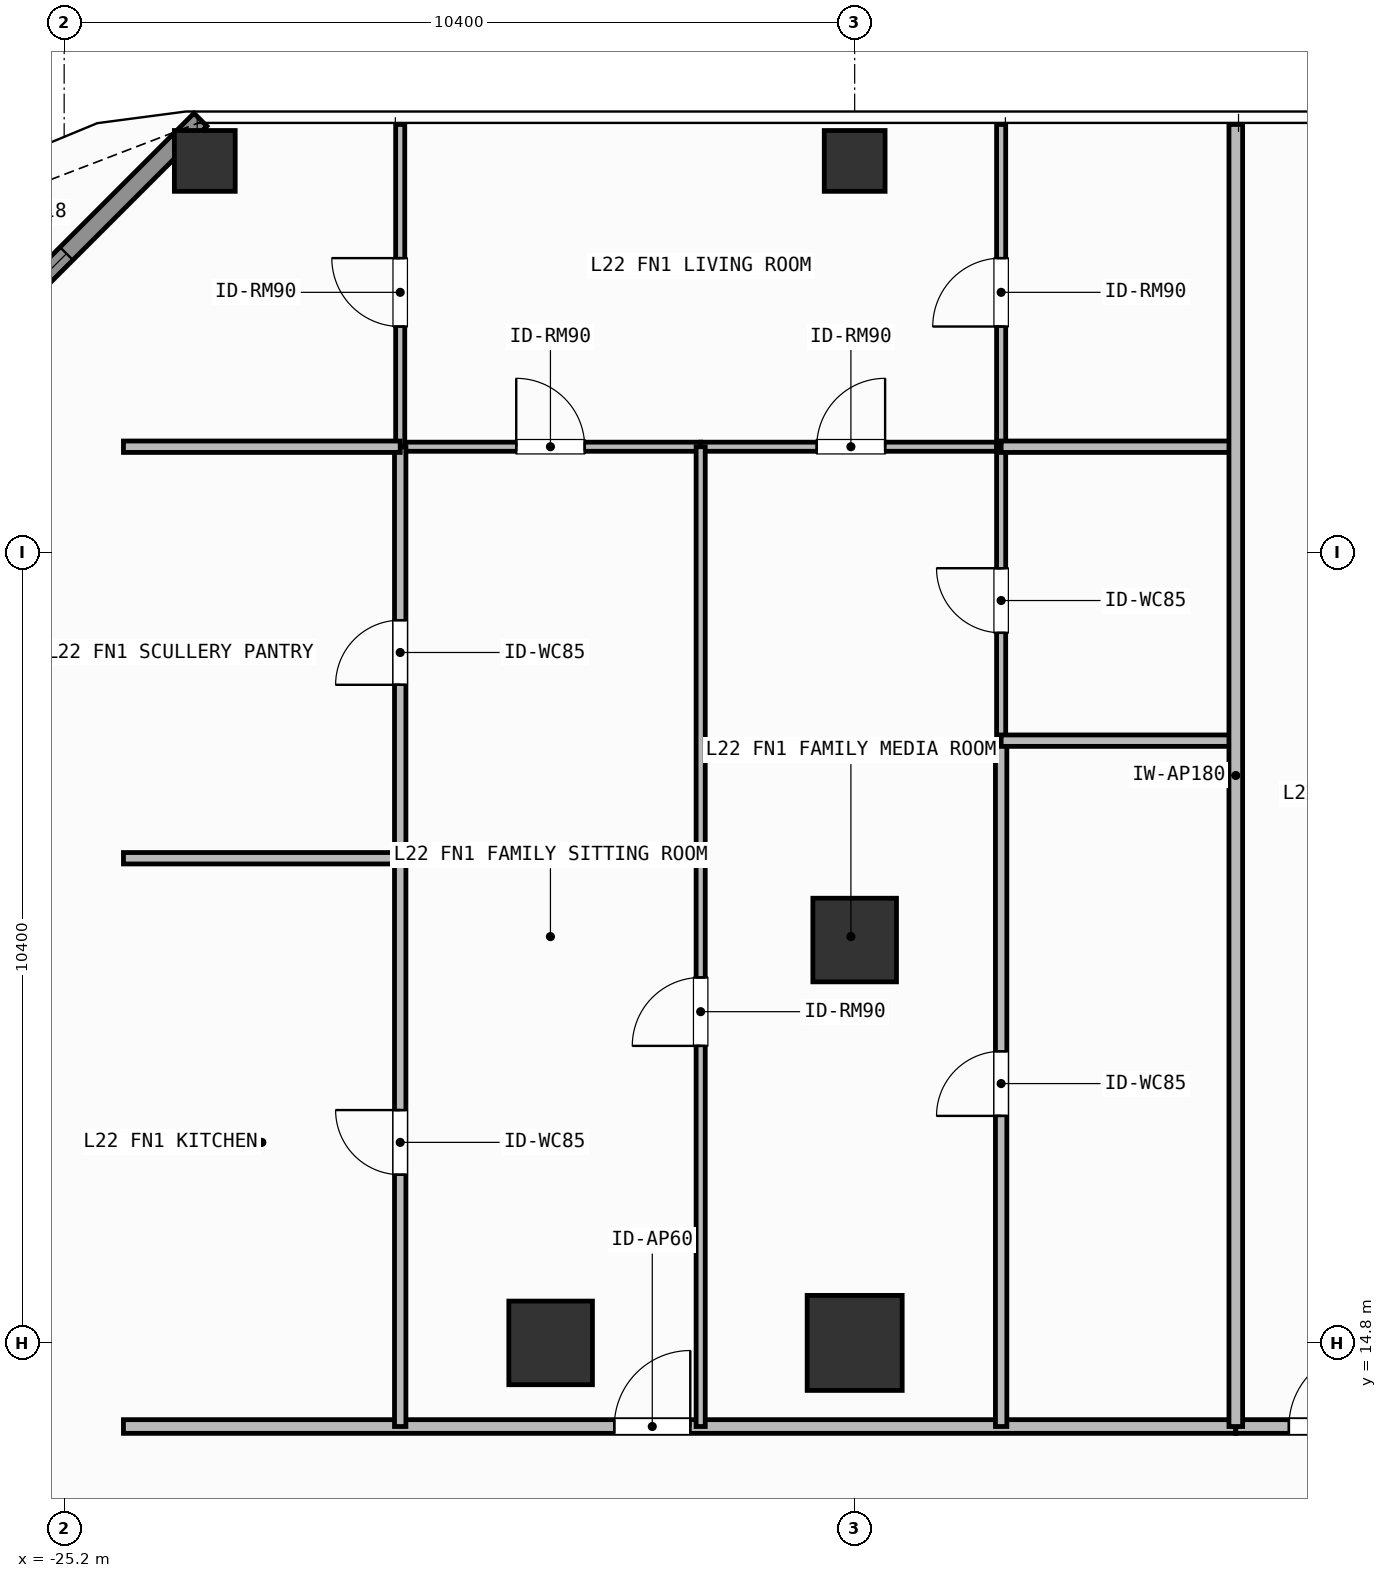
"""IFC4 building model, lengths in metres.
Left out: names, types, materials, properties, quantities, classifications, styles, units other than length and angle.
Written with IfcOpenShell. Run it as: python <this file> out.ifc"""

import sys

from ifc_helpers import new_model, si_unit, direction, frame, frame_2d, origin, origin_2d, place, context, subcontext, project, spatial, rectangle, hollow_rectangle, extrude, element, fill, save


model = new_model("IFC4")
c1 = context("Model", 3, precision=1e-05, world=origin(), true_north=direction((0.0, 1.0)))
c2 = subcontext(c1, "Body", "Model", "MODEL_VIEW")
j1 = project(units=[si_unit("LENGTHUNIT", "METRE"), si_unit("PLANEANGLEUNIT", "RADIAN")], contexts=[c1])
p1 = place(None, origin())
s1 = spatial("IfcSite", under=j1, at=p1, CompositionType="ELEMENT")
p2 = place(p1, origin())
s2 = spatial("IfcBuilding", under=s1, at=p2, CompositionType="ELEMENT")
p3 = place(p2, frame((0.0, 0.0, 89.1)))
s3 = spatial("IfcBuildingStorey", under=s2, at=p3, CompositionType="ELEMENT", Elevation=89.1)
p4 = place(p3, frame((-14.8, 14.8, 0.0), z_axis=(0.0, 0.0, 1.0), x_axis=(1.0, 0.0, 0.0)))
e1 = element("IfcColumn", 1, at=p4, inside=s3, PredefinedType="COLUMN", context=c2, shape_type="SweptSolid", body=[
    extrude(rectangle(XDim=1.25, YDim=1.25, at=origin_2d()), origin(), (0.0, 0.0, 1.0), 3.9),
])
for number, where, z_axis, x_axis in (
    (2, (-18.8, 14.8, 0.0), (0.0, 0.0, 1.0), (1.0, 0.0, 0.0)),
    (3, (-14.8, 20.1, 0.0), (0.0, 0.0, 1.0), (1.0, 0.0, 0.0)),
):
    element("IfcColumn", number, at=place(p3, frame(where, z_axis=z_axis, x_axis=x_axis)), inside=s3, PredefinedType="COLUMN", context=c2, shape_type="SweptSolid", body=[
        extrude(rectangle(XDim=1.1, YDim=1.1, at=origin_2d()), origin(), (0.0, 0.0, 1.0), 3.9),
    ])
for number, where, z_axis, x_axis in (
    (4, (-23.35, 30.35, 0.0), (0.0, 0.0, 1.0), (1.0, 0.0, 0.0)),
    (5, (-14.8, 30.35, 0.0), (0.0, 0.0, 1.0), (1.0, 0.0, 0.0)),
):
    element("IfcColumn", number, at=place(p3, frame(where, z_axis=z_axis, x_axis=x_axis)), inside=s3, PredefinedType="COLUMN", context=c2, shape_type="SweptSolid", body=[
        extrude(hollow_rectangle(XDim=0.8, YDim=0.8, WallThickness=0.036, at=origin_2d()), origin(), (0.0, 0.0, 1.0), 3.9),
    ])
p5 = place(p3, frame((-27.992, 26.308, 0.0), z_axis=(0.0, 0.0, 1.0), x_axis=(0.707106781187, 0.707106781187, 0.0)))
e6 = element("IfcWall", 6, at=p5, inside=s3, PredefinedType="SOLIDWALL", context=c2, shape_type="SweptSolid", body=[
    extrude(rectangle(XDim=6.484, YDim=0.24, at=frame_2d((3.242, 0.0))), origin(), (0.0, 0.0, 1.0), 3.68),
])
p6 = place(p5, frame((2.492, 0.0, 0.8)))
e7 = element("IfcOpeningElement", 7, at=p6, cuts=e6, PredefinedType="OPENING", context=c2, shape_type="SweptSolid", body=[
    extrude(rectangle(XDim=1.5, YDim=1.85, at=frame_2d((0.75, 0.925))), frame((0.0, 0.13, 0.0), z_axis=(0.0, -1.0, 0.0), x_axis=(1.0, 0.0, 0.0)), (0.0, 0.0, 1.0), 0.26),
])
p7 = place(p3, frame((-24.42, 13.7, 0.0), z_axis=(0.0, 0.0, 1.0), x_axis=(1.0, 0.0, 0.0)))
e8 = element("IfcWall", 8, at=p7, inside=s3, PredefinedType="PARTITIONING", context=c2, shape_type="SweptSolid", body=[
    extrude(rectangle(XDim=14.634, YDim=0.18, at=frame_2d((7.317, 0.0))), origin(), (0.0, 0.0, 1.0), 3.68),
])
p8 = place(p7, frame((6.457, 0.0, 0.0)))
e9 = element("IfcOpeningElement", 9, at=p8, cuts=e8, PredefinedType="OPENING", context=c2, shape_type="SweptSolid", body=[
    extrude(rectangle(XDim=1.0, YDim=2.2, at=frame_2d((0.5, 1.1))), frame((0.0, 0.1, 0.0), z_axis=(0.0, -1.0, 0.0), x_axis=(1.0, 0.0, 0.0)), (0.0, 0.0, 1.0), 0.2),
])
p9 = place(p3, frame((-20.779, 26.59, 0.0), z_axis=(0.0, 0.0, 1.0), x_axis=(1.0, 0.0, 0.0)))
e10 = element("IfcWall", 10, at=p9, inside=s3, PredefinedType="PARTITIONING", context=c2, shape_type="SweptSolid", body=[
    extrude(rectangle(XDim=3.953, YDim=0.12, at=frame_2d((1.977, 0.0))), origin(), (0.0, 0.0, 1.0), 3.68),
])
p10 = place(p9, frame((1.527, 0.0, 0.0)))
e11 = element("IfcOpeningElement", 11, at=p10, cuts=e10, PredefinedType="OPENING", context=c2, shape_type="SweptSolid", body=[
    extrude(rectangle(XDim=0.9, YDim=2.1, at=frame_2d((0.45, 1.05))), frame((0.0, 0.07, 0.0), z_axis=(0.0, -1.0, 0.0), x_axis=(1.0, 0.0, 0.0)), (0.0, 0.0, 1.0), 0.14),
])
p11 = place(p3, frame((-16.826, 26.59, 0.0), z_axis=(0.0, 0.0, 1.0), x_axis=(1.0, 0.0, 0.0)))
e12 = element("IfcWall", 12, at=p11, inside=s3, PredefinedType="PARTITIONING", context=c2, shape_type="SweptSolid", body=[
    extrude(rectangle(XDim=3.953, YDim=0.12, at=frame_2d((1.977, 0.0))), origin(), (0.0, 0.0, 1.0), 3.68),
])
p12 = place(p11, frame((1.527, 0.0, 0.0)))
e13 = element("IfcOpeningElement", 13, at=p12, cuts=e12, PredefinedType="OPENING", context=c2, shape_type="SweptSolid", body=[
    extrude(rectangle(XDim=0.9, YDim=2.1, at=frame_2d((0.45, 1.05))), frame((0.0, 0.07, 0.0), z_axis=(0.0, -1.0, 0.0), x_axis=(1.0, 0.0, 0.0)), (0.0, 0.0, 1.0), 0.14),
])
p13 = place(p3, frame((-16.826, 13.7, 0.0), z_axis=(0.0, 0.0, 1.0), x_axis=(0.0, 1.0, 0.0)))
e14 = element("IfcWall", 14, at=p13, inside=s3, PredefinedType="PARTITIONING", context=c2, shape_type="SweptSolid", body=[
    extrude(rectangle(XDim=12.89, YDim=0.12, at=frame_2d((6.445, 0.0))), origin(), (0.0, 0.0, 1.0), 3.68),
])
p14 = place(p13, frame((5.008, 0.0, 0.0)))
e15 = element("IfcOpeningElement", 15, at=p14, cuts=e14, PredefinedType="OPENING", context=c2, shape_type="SweptSolid", body=[
    extrude(rectangle(XDim=0.9, YDim=2.1, at=frame_2d((0.45, 1.05))), frame((0.0, 0.07, 0.0), z_axis=(0.0, -1.0, 0.0), x_axis=(1.0, 0.0, 0.0)), (0.0, 0.0, 1.0), 0.14),
])
p15 = place(p3, frame((-20.779, 13.7, 0.0), z_axis=(0.0, 0.0, 1.0), x_axis=(0.0, 1.0, 0.0)))
e16 = element("IfcWall", 16, at=p15, inside=s3, PredefinedType="PARTITIONING", context=c2, shape_type="SweptSolid", body=[
    extrude(rectangle(XDim=7.476, YDim=0.15, at=frame_2d((3.738, 0.0))), origin(), (0.0, 0.0, 1.0), 3.68),
])
p16 = place(p15, frame((3.313, 0.0, 0.0)))
e17 = element("IfcOpeningElement", 17, at=p16, cuts=e16, PredefinedType="OPENING", context=c2, shape_type="SweptSolid", body=[
    extrude(rectangle(XDim=0.85, YDim=2.1, at=frame_2d((0.425, 1.05))), frame((0.0, 0.085, 0.0), z_axis=(0.0, -1.0, 0.0), x_axis=(1.0, 0.0, 0.0)), (0.0, 0.0, 1.0), 0.17),
])
p17 = place(p3, frame((-20.779, 21.176, 0.0), z_axis=(0.0, 0.0, 1.0), x_axis=(0.0, 1.0, 0.0)))
e18 = element("IfcWall", 18, at=p17, inside=s3, PredefinedType="PARTITIONING", context=c2, shape_type="SweptSolid", body=[
    extrude(rectangle(XDim=5.414, YDim=0.15, at=frame_2d((2.707, 0.0))), origin(), (0.0, 0.0, 1.0), 3.68),
])
p18 = place(p17, frame((2.282, 0.0, 0.0)))
e19 = element("IfcOpeningElement", 19, at=p18, cuts=e18, PredefinedType="OPENING", context=c2, shape_type="SweptSolid", body=[
    extrude(rectangle(XDim=0.85, YDim=2.1, at=frame_2d((0.425, 1.05))), frame((0.0, 0.085, 0.0), z_axis=(0.0, -1.0, 0.0), x_axis=(1.0, 0.0, 0.0)), (0.0, 0.0, 1.0), 0.17),
])
p19 = place(p3, frame((-20.779, 26.59, 0.0), z_axis=(0.0, 0.0, 1.0), x_axis=(0.0, 1.0, 0.0)))
e20 = element("IfcWall", 20, at=p19, inside=s3, PredefinedType="PARTITIONING", context=c2, shape_type="SweptSolid", body=[
    extrude(rectangle(XDim=4.24, YDim=0.12, at=frame_2d((2.12, 0.0))), origin(), (0.0, 0.0, 1.0), 3.68),
])
p20 = place(p19, frame((1.581, 0.0, 0.0)))
e21 = element("IfcOpeningElement", 21, at=p20, cuts=e20, PredefinedType="OPENING", context=c2, shape_type="SweptSolid", body=[
    extrude(rectangle(XDim=0.9, YDim=2.1, at=frame_2d((0.45, 1.05))), frame((0.0, 0.07, 0.0), z_axis=(0.0, -1.0, 0.0), x_axis=(1.0, 0.0, 0.0)), (0.0, 0.0, 1.0), 0.14),
])
p21 = place(p3, frame((-12.873, 13.7, 0.0), z_axis=(0.0, 0.0, 1.0), x_axis=(0.0, 1.0, 0.0)))
e22 = element("IfcWall", 22, at=p21, inside=s3, PredefinedType="PARTITIONING", context=c2, shape_type="SweptSolid", body=[
    extrude(rectangle(XDim=9.023, YDim=0.15, at=frame_2d((4.511, 0.0))), origin(), (0.0, 0.0, 1.0), 3.68),
])
p22 = place(p21, frame((4.086, 0.0, 0.0)))
e23 = element("IfcOpeningElement", 23, at=p22, cuts=e22, PredefinedType="OPENING", context=c2, shape_type="SweptSolid", body=[
    extrude(rectangle(XDim=0.85, YDim=2.1, at=frame_2d((0.425, 1.05))), frame((0.0, 0.085, 0.0), z_axis=(0.0, -1.0, 0.0), x_axis=(1.0, 0.0, 0.0)), (0.0, 0.0, 1.0), 0.17),
])
p23 = place(p3, frame((-12.873, 22.723, 0.0), z_axis=(0.0, 0.0, 1.0), x_axis=(0.0, 1.0, 0.0)))
e24 = element("IfcWall", 24, at=p23, inside=s3, PredefinedType="PARTITIONING", context=c2, shape_type="SweptSolid", body=[
    extrude(rectangle(XDim=3.867, YDim=0.12, at=frame_2d((1.934, 0.0))), origin(), (0.0, 0.0, 1.0), 3.68),
])
p24 = place(p23, frame((1.419, 0.0, 0.0)))
e25 = element("IfcOpeningElement", 25, at=p24, cuts=e24, PredefinedType="OPENING", context=c2, shape_type="SweptSolid", body=[
    extrude(rectangle(XDim=0.85, YDim=2.1, at=frame_2d((0.425, 1.05))), frame((0.0, 0.07, 0.0), z_axis=(0.0, -1.0, 0.0), x_axis=(1.0, 0.0, 0.0)), (0.0, 0.0, 1.0), 0.14),
])
p25 = place(p3, frame((-12.873, 26.59, 0.0), z_axis=(0.0, 0.0, 1.0), x_axis=(0.0, 1.0, 0.0)))
e26 = element("IfcWall", 26, at=p25, inside=s3, PredefinedType="PARTITIONING", context=c2, shape_type="SweptSolid", body=[
    extrude(rectangle(XDim=4.24, YDim=0.12, at=frame_2d((2.12, 0.0))), origin(), (0.0, 0.0, 1.0), 3.68),
])
p26 = place(p25, frame((1.581, 0.0, 0.0)))
e27 = element("IfcOpeningElement", 27, at=p26, cuts=e26, PredefinedType="OPENING", context=c2, shape_type="SweptSolid", body=[
    extrude(rectangle(XDim=0.9, YDim=2.1, at=frame_2d((0.45, 1.05))), frame((0.0, 0.07, 0.0), z_axis=(0.0, -1.0, 0.0), x_axis=(1.0, 0.0, 0.0)), (0.0, 0.0, 1.0), 0.14),
])
p27 = place(p3, frame((-9.786, 13.7, 0.0), z_axis=(0.0, 0.0, 1.0), x_axis=(1.0, 0.0, 0.0)))
e28 = element("IfcWall", 28, at=p27, inside=s3, PredefinedType="PARTITIONING", context=c2, shape_type="SweptSolid", body=[
    extrude(rectangle(XDim=6.886, YDim=0.18, at=frame_2d((3.443, 0.0))), origin(), (0.0, 0.0, 1.0), 3.68),
])
p28 = place(p27, frame((0.698, 0.0, 0.0)))
e29 = element("IfcOpeningElement", 29, at=p28, cuts=e28, PredefinedType="OPENING", context=c2, shape_type="SweptSolid", body=[
    extrude(rectangle(XDim=1.0, YDim=2.2, at=frame_2d((0.5, 1.1))), frame((0.0, 0.1, 0.0), z_axis=(0.0, -1.0, 0.0), x_axis=(1.0, 0.0, 0.0)), (0.0, 0.0, 1.0), 0.2),
])
for number, where, z_axis, x_axis in (
    (30, (-24.42, 21.176, 0.0), (0.0, 0.0, 1.0), (1.0, 0.0, 0.0)),
    (31, (-24.42, 26.59, 0.0), (0.0, 0.0, 1.0), (1.0, 0.0, 0.0)),
):
    element("IfcWall", number, at=place(p3, frame(where, z_axis=z_axis, x_axis=x_axis)), inside=s3, PredefinedType="PARTITIONING", context=c2, shape_type="SweptSolid", body=[
        extrude(rectangle(XDim=3.641, YDim=0.15, at=frame_2d((1.82, 0.0))), origin(), (0.0, 0.0, 1.0), 3.68),
    ])
for number, where, z_axis, x_axis in (
    (32, (-12.873, 22.723, 0.0), (0.0, 0.0, 1.0), (1.0, 0.0, 0.0)),
    (33, (-12.873, 26.59, 0.0), (0.0, 0.0, 1.0), (1.0, 0.0, 0.0)),
):
    element("IfcWall", number, at=place(p3, frame(where, z_axis=z_axis, x_axis=x_axis)), inside=s3, PredefinedType="PARTITIONING", context=c2, shape_type="SweptSolid", body=[
        extrude(rectangle(XDim=3.087, YDim=0.15, at=frame_2d((1.543, 0.0))), origin(), (0.0, 0.0, 1.0), 3.68),
    ])
p29 = place(p3, frame((-9.786, 13.7, 0.0), z_axis=(0.0, 0.0, 1.0), x_axis=(0.0, 1.0, 0.0)))
e34 = element("IfcWall", 34, at=p29, inside=s3, PredefinedType="PARTITIONING", context=c2, shape_type="SweptSolid", body=[
    extrude(rectangle(XDim=17.13, YDim=0.18, at=frame_2d((8.565, 0.0))), origin(), (0.0, 0.0, 1.0), 3.68),
])
p30 = place(p6, origin())
e35 = element("IfcWindow", 35, at=p30, inside=s3, PartitioningType="SINGLE_PANEL", PredefinedType="WINDOW", context=c2, shape_type="SweptSolid", body=[
    extrude(rectangle(XDim=1.5, YDim=1.85, at=frame_2d((0.75, 0.925))), frame((0.0, 0.03, 0.0), z_axis=(0.0, -1.0, 0.0), x_axis=(1.0, 0.0, 0.0)), (0.0, 0.0, 1.0), 0.06),
])
fill(e7, e35)
p31 = place(p8, origin())
e36 = element("IfcDoor", 36, at=p31, inside=s3, OperationType="SINGLE_SWING_RIGHT", PredefinedType="DOOR", context=c2, shape_type="SweptSolid", body=[
    extrude(rectangle(XDim=1.0, YDim=2.2, at=frame_2d((0.5, 1.1))), frame((0.0, 0.025, 0.0), z_axis=(0.0, -1.0, 0.0), x_axis=(1.0, 0.0, 0.0)), (0.0, 0.0, 1.0), 0.05),
])
fill(e9, e36)
p32 = place(p10, origin())
e37 = element("IfcDoor", 37, at=p32, inside=s3, OperationType="SINGLE_SWING_LEFT", PredefinedType="DOOR", context=c2, shape_type="SweptSolid", body=[
    extrude(rectangle(XDim=0.9, YDim=2.1, at=frame_2d((0.45, 1.05))), frame((0.0, 0.025, 0.0), z_axis=(0.0, -1.0, 0.0), x_axis=(1.0, 0.0, 0.0)), (0.0, 0.0, 1.0), 0.05),
])
fill(e11, e37)
p33 = place(p12, origin())
e38 = element("IfcDoor", 38, at=p33, inside=s3, OperationType="SINGLE_SWING_RIGHT", PredefinedType="DOOR", context=c2, shape_type="SweptSolid", body=[
    extrude(rectangle(XDim=0.9, YDim=2.1, at=frame_2d((0.45, 1.05))), frame((0.0, 0.025, 0.0), z_axis=(0.0, -1.0, 0.0), x_axis=(1.0, 0.0, 0.0)), (0.0, 0.0, 1.0), 0.05),
])
fill(e13, e38)
p34 = place(p14, origin())
e39 = element("IfcDoor", 39, at=p34, inside=s3, OperationType="SINGLE_SWING_LEFT", PredefinedType="DOOR", context=c2, shape_type="SweptSolid", body=[
    extrude(rectangle(XDim=0.9, YDim=2.1, at=frame_2d((0.45, 1.05))), frame((0.0, 0.025, 0.0), z_axis=(0.0, -1.0, 0.0), x_axis=(1.0, 0.0, 0.0)), (0.0, 0.0, 1.0), 0.05),
])
fill(e15, e39)
p35 = place(p16, origin())
e40 = element("IfcDoor", 40, at=p35, inside=s3, OperationType="SINGLE_SWING_RIGHT", PredefinedType="DOOR", context=c2, shape_type="SweptSolid", body=[
    extrude(rectangle(XDim=0.85, YDim=2.1, at=frame_2d((0.425, 1.05))), frame((0.0, 0.025, 0.0), z_axis=(0.0, -1.0, 0.0), x_axis=(1.0, 0.0, 0.0)), (0.0, 0.0, 1.0), 0.05),
])
fill(e17, e40)
p36 = place(p18, origin())
e41 = element("IfcDoor", 41, at=p36, inside=s3, OperationType="SINGLE_SWING_LEFT", PredefinedType="DOOR", context=c2, shape_type="SweptSolid", body=[
    extrude(rectangle(XDim=0.85, YDim=2.1, at=frame_2d((0.425, 1.05))), frame((0.0, 0.025, 0.0), z_axis=(0.0, -1.0, 0.0), x_axis=(1.0, 0.0, 0.0)), (0.0, 0.0, 1.0), 0.05),
])
fill(e19, e41)
p37 = place(p20, origin())
e42 = element("IfcDoor", 42, at=p37, inside=s3, OperationType="SINGLE_SWING_RIGHT", PredefinedType="DOOR", context=c2, shape_type="SweptSolid", body=[
    extrude(rectangle(XDim=0.9, YDim=2.1, at=frame_2d((0.45, 1.05))), frame((0.0, 0.025, 0.0), z_axis=(0.0, -1.0, 0.0), x_axis=(1.0, 0.0, 0.0)), (0.0, 0.0, 1.0), 0.05),
])
fill(e21, e42)
p38 = place(p22, origin())
e43 = element("IfcDoor", 43, at=p38, inside=s3, OperationType="SINGLE_SWING_LEFT", PredefinedType="DOOR", context=c2, shape_type="SweptSolid", body=[
    extrude(rectangle(XDim=0.85, YDim=2.1, at=frame_2d((0.425, 1.05))), frame((0.0, 0.025, 0.0), z_axis=(0.0, -1.0, 0.0), x_axis=(1.0, 0.0, 0.0)), (0.0, 0.0, 1.0), 0.05),
])
fill(e23, e43)
p39 = place(p24, origin())
e44 = element("IfcDoor", 44, at=p39, inside=s3, OperationType="SINGLE_SWING_RIGHT", PredefinedType="DOOR", context=c2, shape_type="SweptSolid", body=[
    extrude(rectangle(XDim=0.85, YDim=2.1, at=frame_2d((0.425, 1.05))), frame((0.0, 0.025, 0.0), z_axis=(0.0, -1.0, 0.0), x_axis=(1.0, 0.0, 0.0)), (0.0, 0.0, 1.0), 0.05),
])
fill(e25, e44)
p40 = place(p26, origin())
e45 = element("IfcDoor", 45, at=p40, inside=s3, OperationType="SINGLE_SWING_LEFT", PredefinedType="DOOR", context=c2, shape_type="SweptSolid", body=[
    extrude(rectangle(XDim=0.9, YDim=2.1, at=frame_2d((0.45, 1.05))), frame((0.0, 0.025, 0.0), z_axis=(0.0, -1.0, 0.0), x_axis=(1.0, 0.0, 0.0)), (0.0, 0.0, 1.0), 0.05),
])
fill(e27, e45)
p41 = place(p28, origin())
e46 = element("IfcDoor", 46, at=p41, inside=s3, OperationType="SINGLE_SWING_RIGHT", PredefinedType="DOOR", context=c2, shape_type="SweptSolid", body=[
    extrude(rectangle(XDim=1.0, YDim=2.2, at=frame_2d((0.5, 1.1))), frame((0.0, 0.025, 0.0), z_axis=(0.0, -1.0, 0.0), x_axis=(1.0, 0.0, 0.0)), (0.0, 0.0, 1.0), 0.05),
])
fill(e29, e46)
save(model, sys.argv[1])
